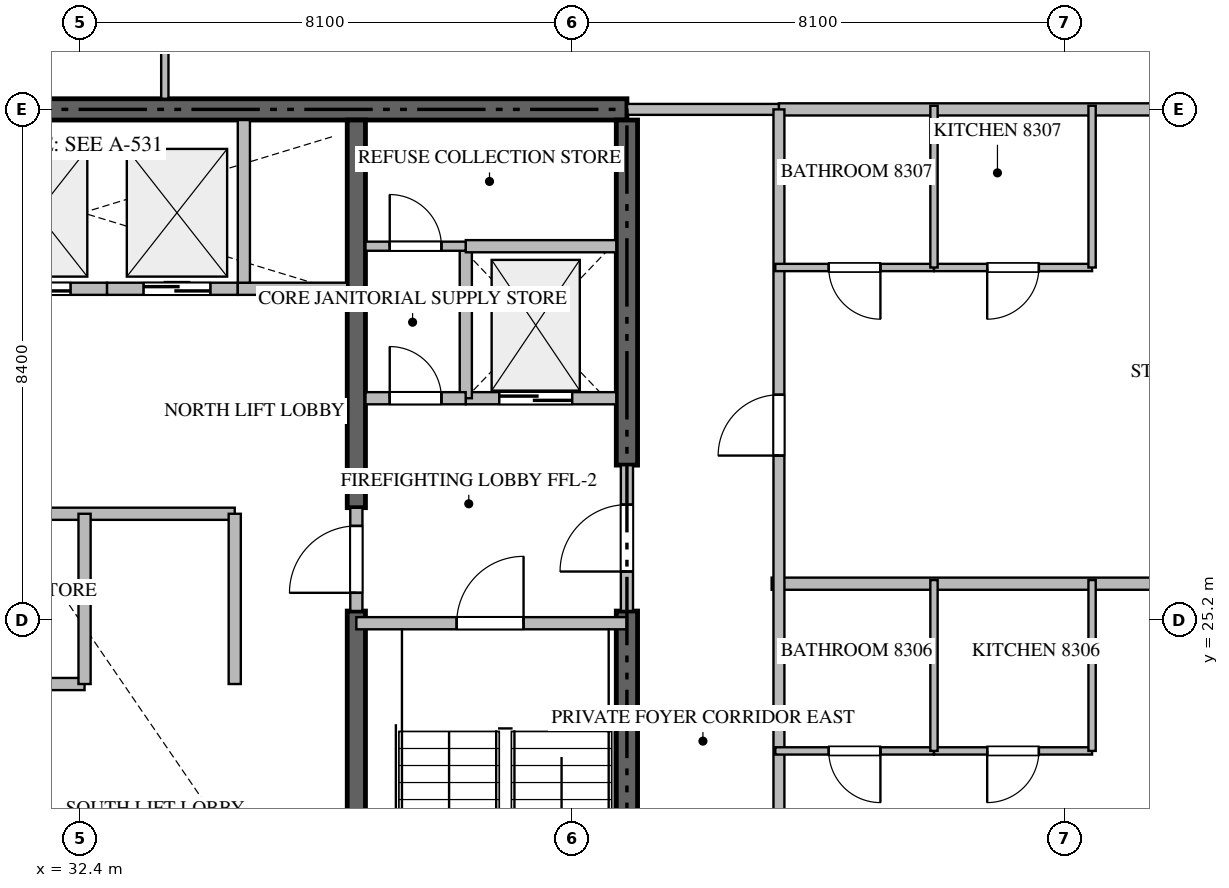
"""IFC4 building model, lengths in metres.
Left out: names, types, materials, properties, quantities, classifications, styles, units other than length and angle.
Written with IfcOpenShell. Run it as: python <this file> out.ifc"""

import sys

from ifc_helpers import new_model, si_unit, direction, frame, frame_2d, origin, place, context, subcontext, project, spatial, rectangle, extrude, source, transform, mapped, element, fill, save


model = new_model("IFC4")
c1 = context("Model", 3, precision=1e-05, world=origin(), true_north=direction((0.0, 1.0)))
c2 = subcontext(c1, "Body", "Model", "MODEL_VIEW")
j1 = project(units=[si_unit("LENGTHUNIT", "METRE"), si_unit("PLANEANGLEUNIT", "RADIAN")], contexts=[c1])
p1 = place(None, origin())
s1 = spatial("IfcSite", under=j1, at=p1, CompositionType="ELEMENT")
p2 = place(p1, origin())
s2 = spatial("IfcBuilding", under=s1, at=p2, CompositionType="ELEMENT")
p3 = place(p2, frame((0.0, 0.0, 333.95)))
s3 = spatial("IfcBuildingStorey", under=s2, at=p3, CompositionType="ELEMENT", Elevation=333.95)
p4 = place(p3, frame((41.4, 33.6, -0.26), z_axis=(0.0, 0.0, 1.0), x_axis=(-1.0, 0.0, 0.0)))
e1 = element("IfcWall", 1, at=p4, inside=s3, PredefinedType="SHEAR", context=c2, shape_type="SweptSolid", body=[
    extrude(rectangle(XDim=18.0, YDim=0.35, at=frame_2d((9.0, 0.0))), origin(), (0.0, 0.0, 1.0), 3.868),
])
p5 = place(p3, frame((41.4, 16.975, -0.26), z_axis=(0.0, 0.0, 1.0), x_axis=(0.0, 1.0, 0.0)))
e2 = element("IfcWall", 2, at=p5, inside=s3, PredefinedType="SHEAR", context=c2, shape_type="SweptSolid", body=[
    extrude(rectangle(XDim=8.375, YDim=0.35, at=frame_2d((4.188, 0.0))), origin(), (0.0, 0.0, 1.0), 3.868),
])
p6 = place(p3, frame((41.4, 27.75, -0.26), z_axis=(0.0, 0.0, 1.0), x_axis=(0.0, 1.0, 0.0)))
e3 = element("IfcWall", 3, at=p6, inside=s3, PredefinedType="SHEAR", context=c2, shape_type="SweptSolid", body=[
    extrude(rectangle(XDim=5.675, YDim=0.35, at=frame_2d((2.837, 0.0))), origin(), (0.0, 0.0, 1.0), 3.868),
])
p7 = place(p3, frame((36.95, 16.975, -0.26), z_axis=(0.0, 0.0, 1.0), x_axis=(0.0, 1.0, 0.0)))
e4 = element("IfcWall", 4, at=p7, inside=s3, PredefinedType="SHEAR", context=c2, shape_type="SweptSolid", body=[
    extrude(rectangle(XDim=8.375, YDim=0.3, at=frame_2d((4.188, 0.0))), origin(), (0.0, 0.0, 1.0), 3.868),
])
p8 = place(p3, frame((36.95, 27.05, -0.26), z_axis=(0.0, 0.0, 1.0), x_axis=(0.0, 1.0, 0.0)))
e5 = element("IfcWall", 5, at=p8, inside=s3, PredefinedType="SHEAR", context=c2, shape_type="SweptSolid", body=[
    extrude(rectangle(XDim=6.375, YDim=0.3, at=frame_2d((3.188, 0.0))), origin(), (0.0, 0.0, 1.0), 3.868),
])
p9 = place(p3, frame((36.95, 25.15, 0.0), z_axis=(0.0, 0.0, 1.0), x_axis=(1.0, 0.0, 0.0)))
e6 = element("IfcWall", 6, at=p9, inside=s3, PredefinedType="STANDARD", context=c2, shape_type="SweptSolid", body=[
    extrude(rectangle(XDim=4.45, YDim=0.2, at=frame_2d((2.225, 0.0))), origin(), (0.0, 0.0, 1.0), 3.61),
])
p10 = place(p9, frame((1.65, 0.0, 0.0)))
e7 = element("IfcOpeningElement", 7, at=p10, cuts=e6, PredefinedType="OPENING", context=c2, shape_type="SweptSolid", body=[
    extrude(rectangle(XDim=1.1, YDim=2.15, at=frame_2d((0.55, 1.075))), frame((0.0, 0.11, 0.0), z_axis=(0.0, -1.0, 0.0), x_axis=(1.0, 0.0, 0.0)), (0.0, 0.0, 1.0), 0.22),
])
p11 = place(p3, frame((38.75, 28.85, 0.0), z_axis=(0.0, 0.0, 1.0), x_axis=(1.0, 0.0, 0.0)))
e8 = element("IfcWall", 8, at=p11, inside=s3, PredefinedType="STANDARD", context=c2, shape_type="SweptSolid", body=[
    extrude(rectangle(XDim=2.475, YDim=0.2, at=frame_2d((1.238, 0.0))), origin(), (0.0, 0.0, 1.0), 3.61),
])
p12 = place(p11, frame((0.55, 0.0, 0.0)))
e9 = element("IfcOpeningElement", 9, at=p12, cuts=e8, PredefinedType="OPENING", context=c2, shape_type="SweptSolid", body=[
    extrude(rectangle(XDim=1.2, YDim=2.2, at=frame_2d((0.6, 1.1))), frame((0.0, 0.11, 0.0), z_axis=(0.0, -1.0, 0.0), x_axis=(1.0, 0.0, 0.0)), (0.0, 0.0, 1.0), 0.22),
])
p13 = place(p3, frame((30.55, 30.65, 0.0), z_axis=(0.0, 0.0, 1.0), x_axis=(1.0, 0.0, 0.0)))
e10 = element("IfcWall", 10, at=p13, inside=s3, PredefinedType="STANDARD", context=c2, shape_type="SweptSolid", body=[
    extrude(rectangle(XDim=2.3, YDim=0.2, at=frame_2d((1.15, 0.0))), origin(), (0.0, 0.0, 1.0), 3.61),
])
p14 = place(p13, frame((0.6, 0.0, 0.0)))
e11 = element("IfcOpeningElement", 11, at=p14, cuts=e10, PredefinedType="OPENING", context=c2, shape_type="SweptSolid", body=[
    extrude(rectangle(XDim=1.1, YDim=2.2, at=frame_2d((0.55, 1.1))), frame((0.0, 0.11, 0.0), z_axis=(0.0, -1.0, 0.0), x_axis=(1.0, 0.0, 0.0)), (0.0, 0.0, 1.0), 0.22),
])
p15 = place(p3, frame((32.85, 30.65, 0.0), z_axis=(0.0, 0.0, 1.0), x_axis=(1.0, 0.0, 0.0)))
e12 = element("IfcWall", 12, at=p15, inside=s3, PredefinedType="STANDARD", context=c2, shape_type="SweptSolid", body=[
    extrude(rectangle(XDim=2.15, YDim=0.2, at=frame_2d((1.075, 0.0))), origin(), (0.0, 0.0, 1.0), 3.61),
])
p16 = place(p15, frame((0.6, 0.0, 0.0)))
e13 = element("IfcOpeningElement", 13, at=p16, cuts=e12, PredefinedType="OPENING", context=c2, shape_type="SweptSolid", body=[
    extrude(rectangle(XDim=1.1, YDim=2.2, at=frame_2d((0.55, 1.1))), frame((0.0, 0.11, 0.0), z_axis=(0.0, -1.0, 0.0), x_axis=(1.0, 0.0, 0.0)), (0.0, 0.0, 1.0), 0.22),
])
p17 = place(p3, frame((35.0, 30.65, 0.0), z_axis=(0.0, 0.0, 1.0), x_axis=(1.0, 0.0, 0.0)))
e14 = element("IfcWall", 14, at=p17, inside=s3, PredefinedType="STANDARD", context=c2, shape_type="SweptSolid", body=[
    extrude(rectangle(XDim=1.8, YDim=0.2, at=frame_2d((0.9, 0.0))), origin(), (0.0, 0.0, 1.0), 3.61),
])
p18 = place(p3, frame((35.1, 30.75, 0.0), z_axis=(0.0, 0.0, 1.0), x_axis=(0.0, 1.0, 0.0)))
e15 = element("IfcWall", 15, at=p18, inside=s3, PredefinedType="STANDARD", context=c2, shape_type="SweptSolid", body=[
    extrude(rectangle(XDim=2.675, YDim=0.2, at=frame_2d((1.337, 0.0))), origin(), (0.0, 0.0, 1.0), 3.61),
])
p19 = place(p3, frame((38.75, 28.85, 0.0), z_axis=(0.0, 0.0, 1.0), x_axis=(0.0, 1.0, 0.0)))
e16 = element("IfcWall", 16, at=p19, inside=s3, PredefinedType="STANDARD", context=c2, shape_type="SweptSolid", body=[
    extrude(rectangle(XDim=2.5, YDim=0.2, at=frame_2d((1.25, 0.0))), origin(), (0.0, 0.0, 1.0), 3.61),
])
p20 = place(p3, frame((38.75, 31.35, 0.0), z_axis=(0.0, 0.0, 1.0), x_axis=(1.0, 0.0, 0.0)))
e17 = element("IfcWall", 17, at=p20, inside=s3, PredefinedType="STANDARD", context=c2, shape_type="SweptSolid", body=[
    extrude(rectangle(XDim=2.475, YDim=0.2, at=frame_2d((1.238, 0.0))), origin(), (0.0, 0.0, 1.0), 3.61),
])
p21 = place(p3, frame((37.1, 28.85, 0.0), z_axis=(0.0, 0.0, 1.0), x_axis=(1.0, 0.0, 0.0)))
e18 = element("IfcWall", 18, at=p21, inside=s3, PredefinedType="STANDARD", context=c2, shape_type="SweptSolid", body=[
    extrude(rectangle(XDim=1.648, YDim=0.2, at=frame_2d((0.824, 0.0))), origin(), (0.0, 0.0, 1.0), 3.61),
])
p22 = place(p21, frame((0.399, 0.0, 0.0)))
e19 = element("IfcOpeningElement", 19, at=p22, cuts=e18, PredefinedType="OPENING", context=c2, shape_type="SweptSolid", body=[
    extrude(rectangle(XDim=0.85, YDim=2.1, at=frame_2d((0.425, 1.05))), frame((0.0, 0.11, 0.0), z_axis=(0.0, -1.0, 0.0), x_axis=(1.0, 0.0, 0.0)), (0.0, 0.0, 1.0), 0.22),
])
p23 = place(p3, frame((41.4, 25.352, 0.0), z_axis=(0.0, 0.0, 1.0), x_axis=(0.0, 1.0, 0.0)))
e20 = element("IfcWall", 20, at=p23, inside=s3, PredefinedType="STANDARD", context=c2, shape_type="SweptSolid", body=[
    extrude(rectangle(XDim=2.396, YDim=0.2, at=frame_2d((1.198, 0.0))), origin(), (0.0, 0.0, 1.0), 3.61),
])
p24 = place(p23, frame((0.648, 0.0, 0.0)))
e21 = element("IfcOpeningElement", 21, at=p24, cuts=e20, PredefinedType="OPENING", context=c2, shape_type="SweptSolid", body=[
    extrude(rectangle(XDim=1.1, YDim=2.15, at=frame_2d((0.55, 1.075))), frame((0.0, 0.11, 0.0), z_axis=(0.0, -1.0, 0.0), x_axis=(1.0, 0.0, 0.0)), (0.0, 0.0, 1.0), 0.22),
])
p25 = place(p3, frame((36.95, 25.352, 0.0), z_axis=(0.0, 0.0, 1.0), x_axis=(0.0, 1.0, 0.0)))
e22 = element("IfcWall", 22, at=p25, inside=s3, PredefinedType="STANDARD", context=c2, shape_type="SweptSolid", body=[
    extrude(rectangle(XDim=1.696, YDim=0.2, at=frame_2d((0.848, 0.0))), origin(), (0.0, 0.0, 1.0), 3.61),
])
p26 = place(p25, frame((0.298, 0.0, 0.0)))
e23 = element("IfcOpeningElement", 23, at=p26, cuts=e22, PredefinedType="OPENING", context=c2, shape_type="SweptSolid", body=[
    extrude(rectangle(XDim=1.1, YDim=2.15, at=frame_2d((0.55, 1.075))), frame((0.0, 0.11, 0.0), z_axis=(0.0, -1.0, 0.0), x_axis=(1.0, 0.0, 0.0)), (0.0, 0.0, 1.0), 0.22),
])
p27 = place(p3, frame((37.1, 31.35, 0.0), z_axis=(0.0, 0.0, 1.0), x_axis=(1.0, 0.0, 0.0)))
e24 = element("IfcWall", 24, at=p27, inside=s3, PredefinedType="PARTITIONING", context=c2, shape_type="SweptSolid", body=[
    extrude(rectangle(XDim=1.648, YDim=0.15, at=frame_2d((0.824, 0.0))), origin(), (0.0, 0.0, 1.0), 3.61),
])
p28 = place(p27, frame((0.399, 0.0, 0.0)))
e25 = element("IfcOpeningElement", 25, at=p28, cuts=e24, PredefinedType="OPENING", context=c2, shape_type="SweptSolid", body=[
    extrude(rectangle(XDim=0.85, YDim=2.1, at=frame_2d((0.425, 1.05))), frame((0.0, 0.085, 0.0), z_axis=(0.0, -1.0, 0.0), x_axis=(1.0, 0.0, 0.0)), (0.0, 0.0, 1.0), 0.17),
])
p29 = place(p3, frame((28.0, 26.95, 0.0), z_axis=(0.0, 0.0, 1.0), x_axis=(1.0, 0.0, 0.0)))
e26 = element("IfcWall", 26, at=p29, inside=s3, PredefinedType="STANDARD", context=c2, shape_type="SweptSolid", body=[
    extrude(rectangle(XDim=6.95, YDim=0.2, at=frame_2d((3.475, 0.0))), origin(), (0.0, 0.0, 1.0), 3.61),
])
p30 = place(p3, frame((34.95, 24.15, 0.0), z_axis=(0.0, 0.0, 1.0), x_axis=(0.0, 1.0, 0.0)))
e27 = element("IfcWall", 27, at=p30, inside=s3, PredefinedType="STANDARD", context=c2, shape_type="SweptSolid", body=[
    extrude(rectangle(XDim=2.8, YDim=0.2, at=frame_2d((1.4, 0.0))), origin(), (0.0, 0.0, 1.0), 3.61),
])
p31 = place(p3, frame((28.0, 24.15, 0.0), z_axis=(0.0, 0.0, 1.0), x_axis=(1.0, 0.0, 0.0)))
e28 = element("IfcWall", 28, at=p31, inside=s3, PredefinedType="STANDARD", context=c2, shape_type="SweptSolid", body=[
    extrude(rectangle(XDim=4.48, YDim=0.2, at=frame_2d((2.24, 0.0))), origin(), (0.0, 0.0, 1.0), 3.61),
])
p32 = place(p31, frame((1.79, 0.0, 0.0)))
e29 = element("IfcOpeningElement", 29, at=p32, cuts=e28, PredefinedType="OPENING", context=c2, shape_type="SweptSolid", body=[
    extrude(rectangle(XDim=0.9, YDim=2.1, at=frame_2d((0.45, 1.05))), frame((0.0, 0.11, 0.0), z_axis=(0.0, -1.0, 0.0), x_axis=(1.0, 0.0, 0.0)), (0.0, 0.0, 1.0), 0.22),
])
p33 = place(p3, frame((32.48, 24.15, 0.0), z_axis=(0.0, 0.0, 1.0), x_axis=(0.0, 1.0, 0.0)))
e30 = element("IfcWall", 30, at=p33, inside=s3, PredefinedType="STANDARD", context=c2, shape_type="SweptSolid", body=[
    extrude(rectangle(XDim=2.8, YDim=0.2, at=frame_2d((1.4, 0.0))), origin(), (0.0, 0.0, 1.0), 3.61),
])
p34 = place(p3, frame((43.78, 25.8, 0.0), z_axis=(0.0, 0.0, 1.0), x_axis=(1.0, 0.0, 0.0)))
e31 = element("IfcWall", 31, at=p34, inside=s3, PredefinedType="PARTITIONING", context=c2, shape_type="SweptSolid", body=[
    extrude(rectangle(XDim=11.738, YDim=0.2, at=frame_2d((5.869, 0.0))), origin(), (0.0, 0.0, 1.0), 3.61),
])
p35 = place(p3, frame((43.9, 33.6, 0.0), z_axis=(0.0, 0.0, 1.0), x_axis=(1.0, 0.0, 0.0)))
e32 = element("IfcWall", 32, at=p35, inside=s3, PredefinedType="PARTITIONING", context=c2, shape_type="SweptSolid", body=[
    extrude(rectangle(XDim=11.618, YDim=0.2, at=frame_2d((5.809, 0.0))), origin(), (0.0, 0.0, 1.0), 3.61),
])
p36 = place(p3, frame((41.402, 33.6, 0.0), z_axis=(0.0, 0.0, 1.0), x_axis=(1.0, 0.0, 0.0)))
e33 = element("IfcWall", 33, at=p36, inside=s3, PredefinedType="PARTITIONING", context=c2, shape_type="SweptSolid", body=[
    extrude(rectangle(XDim=2.496, YDim=0.18, at=frame_2d((1.248, 0.0))), origin(), (0.0, 0.0, 1.0), 3.61),
])
p37 = place(p3, frame((43.9, 16.8, 0.0), z_axis=(0.0, 0.0, 1.0), x_axis=(0.0, 1.0, 0.0)))
e34 = element("IfcWall", 34, at=p37, inside=s3, PredefinedType="PARTITIONING", context=c2, shape_type="SweptSolid", body=[
    extrude(rectangle(XDim=16.8, YDim=0.18, at=frame_2d((8.4, 0.0))), origin(), (0.0, 0.0, 1.0), 3.61),
])
p38 = place(p37, frame((2.67, 0.0, 0.0)))
e35 = element("IfcOpeningElement", 35, at=p38, cuts=e34, PredefinedType="OPENING", context=c2, shape_type="SweptSolid", body=[
    extrude(rectangle(XDim=1.0, YDim=2.15, at=frame_2d((0.5, 1.075))), frame((0.0, 0.1, 0.0), z_axis=(0.0, -1.0, 0.0), x_axis=(1.0, 0.0, 0.0)), (0.0, 0.0, 1.0), 0.2),
])
p39 = place(p37, frame((11.107, 0.0, 0.0)))
e36 = element("IfcOpeningElement", 36, at=p39, cuts=e34, PredefinedType="OPENING", context=c2, shape_type="SweptSolid", body=[
    extrude(rectangle(XDim=1.0, YDim=2.15, at=frame_2d((0.5, 1.075))), frame((0.0, 0.1, 0.0), z_axis=(0.0, -1.0, 0.0), x_axis=(1.0, 0.0, 0.0)), (0.0, 0.0, 1.0), 0.2),
])
p40 = place(p3, frame((33.8, 35.748, 0.0), z_axis=(0.0, 0.0, 1.0), x_axis=(0.0, -1.0, 0.0)))
e37 = element("IfcWall", 37, at=p40, inside=s3, PredefinedType="PARTITIONING", context=c2, shape_type="SweptSolid", body=[
    extrude(rectangle(XDim=1.973, YDim=0.12, at=frame_2d((0.987, 0.0))), origin(), (0.0, 0.0, 1.0), 3.61),
])
p41 = place(p3, frame((49.05, 23.05, 0.0), z_axis=(0.0, 0.0, 1.0), x_axis=(-1.0, 0.0, 0.0)))
e38 = element("IfcWall", 38, at=p41, inside=s3, PredefinedType="PARTITIONING", context=c2, shape_type="SweptSolid", body=[
    extrude(rectangle(XDim=2.6, YDim=0.12, at=frame_2d((1.3, 0.0))), origin(), (0.0, 0.0, 1.0), 3.61),
])
p42 = place(p41, frame((0.875, 0.0, 0.0)))
e39 = element("IfcOpeningElement", 39, at=p42, cuts=e38, PredefinedType="OPENING", context=c2, shape_type="SweptSolid", body=[
    extrude(rectangle(XDim=0.85, YDim=2.1, at=frame_2d((0.425, 1.05))), frame((0.0, 0.07, 0.0), z_axis=(0.0, -1.0, 0.0), x_axis=(1.0, 0.0, 0.0)), (0.0, 0.0, 1.0), 0.14),
])
p43 = place(p3, frame((46.448, 23.05, 0.0), z_axis=(0.0, 0.0, 1.0), x_axis=(-1.0, 0.0, 0.0)))
e40 = element("IfcWall", 40, at=p43, inside=s3, PredefinedType="PARTITIONING", context=c2, shape_type="SweptSolid", body=[
    extrude(rectangle(XDim=2.608, YDim=0.12, at=frame_2d((1.304, 0.0))), origin(), (0.0, 0.0, 1.0), 3.61),
])
p44 = place(p43, frame((0.879, 0.0, 0.0)))
e41 = element("IfcOpeningElement", 41, at=p44, cuts=e40, PredefinedType="OPENING", context=c2, shape_type="SweptSolid", body=[
    extrude(rectangle(XDim=0.85, YDim=2.1, at=frame_2d((0.425, 1.05))), frame((0.0, 0.07, 0.0), z_axis=(0.0, -1.0, 0.0), x_axis=(1.0, 0.0, 0.0)), (0.0, 0.0, 1.0), 0.14),
])
for number, where, z_axis, x_axis in (
    (42, (46.45, 23.05, 0.0), (0.0, 0.0, 1.0), (0.0, 1.0, 0.0)),
    (43, (49.05, 23.05, 0.0), (0.0, 0.0, 1.0), (0.0, 1.0, 0.0)),
):
    element("IfcWall", number, at=place(p3, frame(where, z_axis=z_axis, x_axis=x_axis)), inside=s3, PredefinedType="PARTITIONING", context=c2, shape_type="SweptSolid", body=[
        extrude(rectangle(XDim=2.81, YDim=0.12, at=frame_2d((1.405, 0.0))), origin(), (0.0, 0.0, 1.0), 3.61),
    ])
p45 = place(p3, frame((49.05, 31.0, 0.0), z_axis=(0.0, 0.0, 1.0), x_axis=(-1.0, 0.0, 0.0)))
e44 = element("IfcWall", 44, at=p45, inside=s3, PredefinedType="PARTITIONING", context=c2, shape_type="SweptSolid", body=[
    extrude(rectangle(XDim=2.6, YDim=0.12, at=frame_2d((1.3, 0.0))), origin(), (0.0, 0.0, 1.0), 3.61),
])
p46 = place(p45, frame((0.875, 0.0, 0.0)))
e45 = element("IfcOpeningElement", 45, at=p46, cuts=e44, PredefinedType="OPENING", context=c2, shape_type="SweptSolid", body=[
    extrude(rectangle(XDim=0.85, YDim=2.1, at=frame_2d((0.425, 1.05))), frame((0.0, 0.07, 0.0), z_axis=(0.0, -1.0, 0.0), x_axis=(1.0, 0.0, 0.0)), (0.0, 0.0, 1.0), 0.14),
])
p47 = place(p3, frame((46.448, 31.0, 0.0), z_axis=(0.0, 0.0, 1.0), x_axis=(-1.0, 0.0, 0.0)))
e46 = element("IfcWall", 46, at=p47, inside=s3, PredefinedType="PARTITIONING", context=c2, shape_type="SweptSolid", body=[
    extrude(rectangle(XDim=2.608, YDim=0.12, at=frame_2d((1.304, 0.0))), origin(), (0.0, 0.0, 1.0), 3.61),
])
p48 = place(p47, frame((0.879, 0.0, 0.0)))
e47 = element("IfcOpeningElement", 47, at=p48, cuts=e46, PredefinedType="OPENING", context=c2, shape_type="SweptSolid", body=[
    extrude(rectangle(XDim=0.85, YDim=2.1, at=frame_2d((0.425, 1.05))), frame((0.0, 0.07, 0.0), z_axis=(0.0, -1.0, 0.0), x_axis=(1.0, 0.0, 0.0)), (0.0, 0.0, 1.0), 0.14),
])
for number, where, z_axis, x_axis in (
    (48, (46.45, 31.0, 0.0), (0.0, 0.0, 1.0), (0.0, 1.0, 0.0)),
    (49, (49.05, 31.0, 0.0), (0.0, 0.0, 1.0), (0.0, 1.0, 0.0)),
):
    element("IfcWall", number, at=place(p3, frame(where, z_axis=z_axis, x_axis=x_axis)), inside=s3, PredefinedType="PARTITIONING", context=c2, shape_type="SweptSolid", body=[
        extrude(rectangle(XDim=2.66, YDim=0.12, at=frame_2d((1.33, 0.0))), origin(), (0.0, 0.0, 1.0), 3.61),
    ])
m1 = source(origin(), c2, "Body", "SweptSolid", [
    extrude(rectangle(XDim=1.1, YDim=2.15, at=frame_2d((0.55, 1.075))), frame((0.0, 0.025, 0.0), z_axis=(0.0, -1.0, 0.0), x_axis=(1.0, 0.0, 0.0)), (0.0, 0.0, 1.0), 0.05),
])
p49 = place(p10, origin())
e50 = element("IfcDoor", 50, at=p49, inside=s3, OperationType="SINGLE_SWING_RIGHT", PredefinedType="DOOR", context=c2, shape_type="MappedRepresentation", body=[
    mapped(m1, transform((0.0, 0.0, 0.0), scale=1.0)),
])
fill(e7, e50)
m2 = source(origin(), c2, "Body", "SweptSolid", [
    extrude(rectangle(XDim=1.2, YDim=2.2, at=frame_2d((0.6, 1.1))), frame((0.0, 0.025, 0.0), z_axis=(0.0, -1.0, 0.0), x_axis=(1.0, 0.0, 0.0)), (0.0, 0.0, 1.0), 0.05),
])
p50 = place(p12, origin())
e51 = element("IfcDoor", 51, at=p50, inside=s3, OperationType="DOUBLE_DOOR_SLIDING", PredefinedType="DOOR", context=c2, shape_type="MappedRepresentation", body=[
    mapped(m2, transform((0.0, 0.0, 0.0), scale=1.0)),
])
fill(e9, e51)
m3 = source(origin(), c2, "Body", "SweptSolid", [
    extrude(rectangle(XDim=1.1, YDim=2.2, at=frame_2d((0.55, 1.1))), frame((0.0, 0.025, 0.0), z_axis=(0.0, -1.0, 0.0), x_axis=(1.0, 0.0, 0.0)), (0.0, 0.0, 1.0), 0.05),
])
p51 = place(p14, origin())
e52 = element("IfcDoor", 52, at=p51, inside=s3, OperationType="DOUBLE_DOOR_SLIDING", PredefinedType="DOOR", context=c2, shape_type="MappedRepresentation", body=[
    mapped(m3, transform((0.0, 0.0, 0.0), scale=1.0)),
])
fill(e11, e52)
p52 = place(p16, origin())
e53 = element("IfcDoor", 53, at=p52, inside=s3, OperationType="DOUBLE_DOOR_SLIDING", PredefinedType="DOOR", context=c2, shape_type="MappedRepresentation", body=[
    mapped(m3, transform((0.0, 0.0, 0.0), scale=1.0)),
])
fill(e13, e53)
m4 = source(origin(), c2, "Body", "SweptSolid", [
    extrude(rectangle(XDim=0.85, YDim=2.1, at=frame_2d((0.425, 1.05))), frame((0.0, 0.025, 0.0), z_axis=(0.0, -1.0, 0.0), x_axis=(1.0, 0.0, 0.0)), (0.0, 0.0, 1.0), 0.05),
])
p53 = place(p22, origin())
e54 = element("IfcDoor", 54, at=p53, inside=s3, OperationType="SINGLE_SWING_LEFT", PredefinedType="DOOR", context=c2, shape_type="MappedRepresentation", body=[
    mapped(m4, transform((0.0, 0.0, 0.0), scale=1.0)),
])
fill(e19, e54)
p54 = place(p24, origin())
e55 = element("IfcDoor", 55, at=p54, inside=s3, OperationType="SINGLE_SWING_LEFT", PredefinedType="DOOR", context=c2, shape_type="MappedRepresentation", body=[
    mapped(m1, transform((0.0, 0.0, 0.0), scale=1.0)),
])
fill(e21, e55)
p55 = place(p26, origin())
e56 = element("IfcDoor", 56, at=p55, inside=s3, OperationType="SINGLE_SWING_LEFT", PredefinedType="DOOR", context=c2, shape_type="MappedRepresentation", body=[
    mapped(m1, transform((0.0, 0.0, 0.0), scale=1.0)),
])
fill(e23, e56)
p56 = place(p28, origin())
e57 = element("IfcDoor", 57, at=p56, inside=s3, OperationType="SINGLE_SWING_LEFT", PredefinedType="DOOR", context=c2, shape_type="MappedRepresentation", body=[
    mapped(m4, transform((0.0, 0.0, 0.0), scale=1.0)),
])
fill(e25, e57)
m5 = source(origin(), c2, "Body", "SweptSolid", [
    extrude(rectangle(XDim=1.0, YDim=2.15, at=frame_2d((0.5, 1.075))), frame((0.0, 0.025, 0.0), z_axis=(0.0, -1.0, 0.0), x_axis=(1.0, 0.0, 0.0)), (0.0, 0.0, 1.0), 0.05),
])
p57 = place(p39, origin())
e58 = element("IfcDoor", 58, at=p57, inside=s3, OperationType="SINGLE_SWING_LEFT", PredefinedType="DOOR", context=c2, shape_type="MappedRepresentation", body=[
    mapped(m5, transform((0.0, 0.0, 0.0), scale=1.0)),
])
fill(e36, e58)
p58 = place(p42, origin())
e59 = element("IfcDoor", 59, at=p58, inside=s3, OperationType="SINGLE_SWING_RIGHT", PredefinedType="DOOR", context=c2, shape_type="MappedRepresentation", body=[
    mapped(m4, transform((0.0, 0.0, 0.0), scale=1.0)),
])
fill(e39, e59)
p59 = place(p44, origin())
e60 = element("IfcDoor", 60, at=p59, inside=s3, OperationType="SINGLE_SWING_LEFT", PredefinedType="DOOR", context=c2, shape_type="MappedRepresentation", body=[
    mapped(m4, transform((0.0, 0.0, 0.0), scale=1.0)),
])
fill(e41, e60)
p60 = place(p46, origin())
e61 = element("IfcDoor", 61, at=p60, inside=s3, OperationType="SINGLE_SWING_RIGHT", PredefinedType="DOOR", context=c2, shape_type="MappedRepresentation", body=[
    mapped(m4, transform((0.0, 0.0, 0.0), scale=1.0)),
])
fill(e45, e61)
p61 = place(p48, origin())
e62 = element("IfcDoor", 62, at=p61, inside=s3, OperationType="SINGLE_SWING_LEFT", PredefinedType="DOOR", context=c2, shape_type="MappedRepresentation", body=[
    mapped(m4, transform((0.0, 0.0, 0.0), scale=1.0)),
])
fill(e47, e62)
save(model, sys.argv[1])
